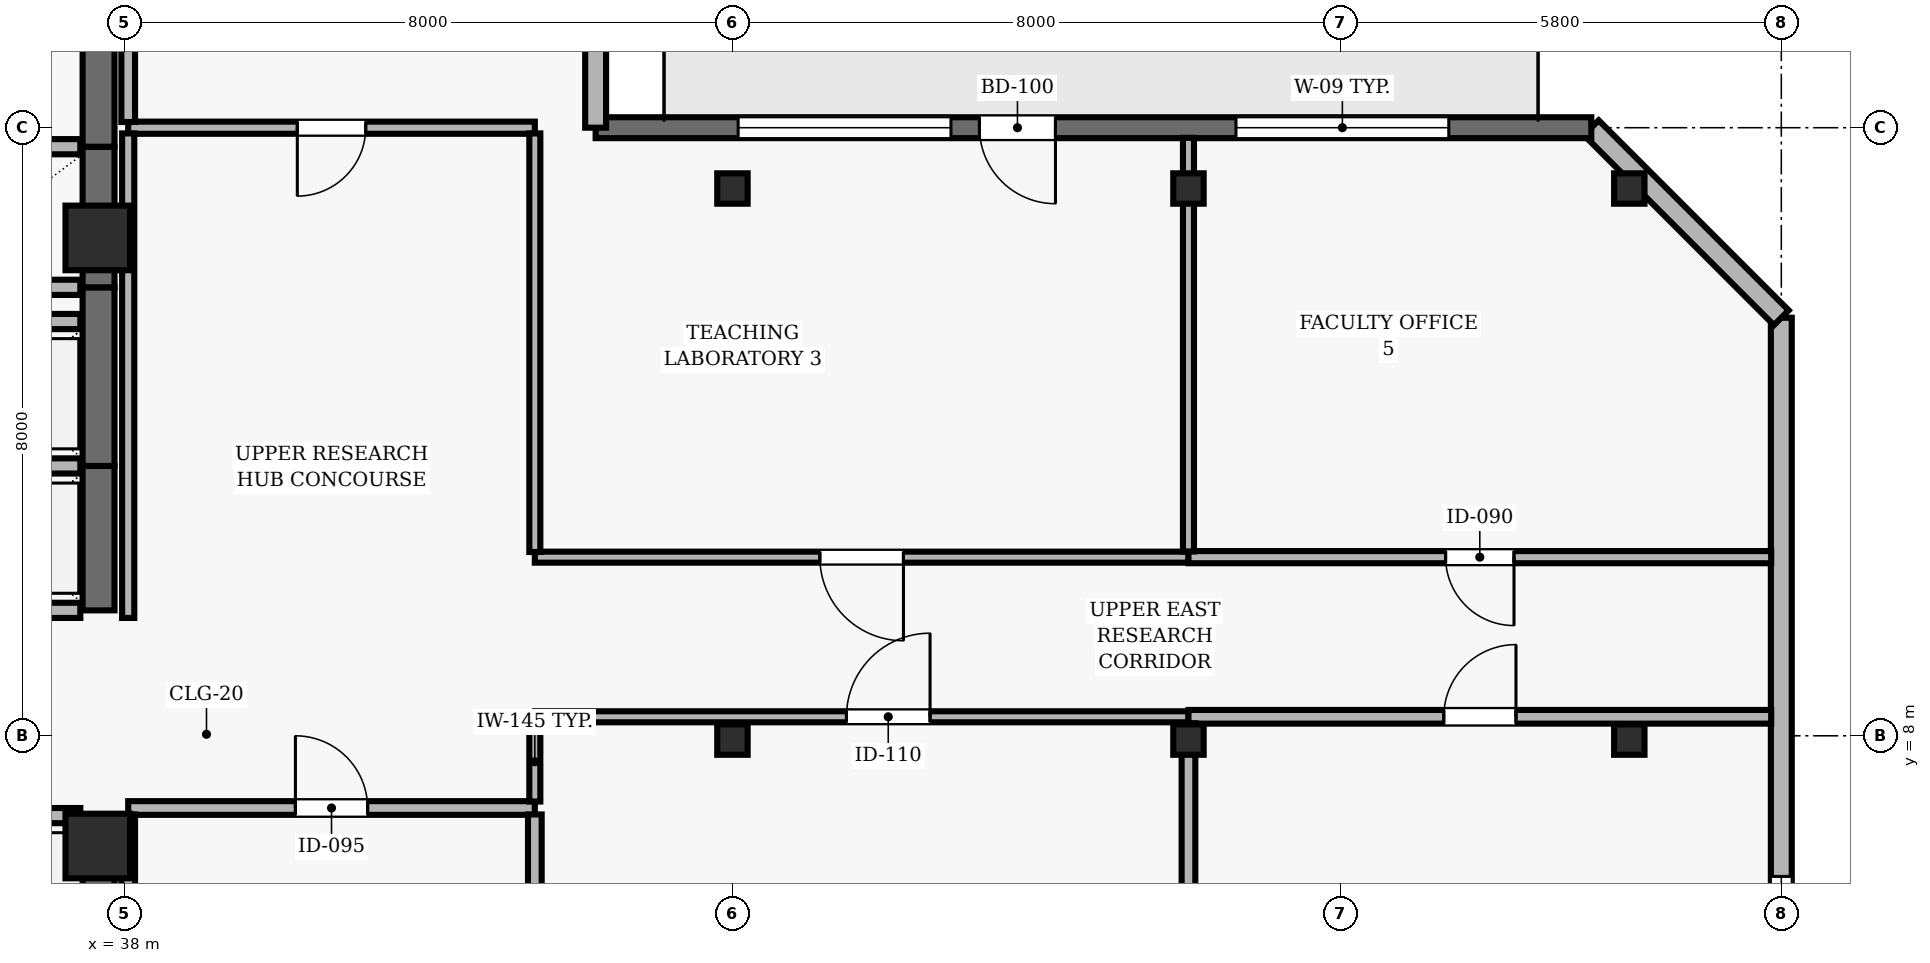
"""IFC4 building model, lengths in metres.
Left out: names, types, materials, properties, quantities, classifications, styles, units other than length and angle.
Written with IfcOpenShell. Run it as: python <this file> out.ifc"""

import sys

from ifc_helpers import new_model, si_unit, direction, frame, frame_2d, origin, origin_2d, place, context, subcontext, project, spatial, rectangle, hollow_rectangle, extrude, element, fill, save


model = new_model("IFC4")
c1 = context("Model", 3, precision=1e-05, world=origin(), true_north=direction((0.0, 1.0)))
c2 = subcontext(c1, "Body", "Model", "MODEL_VIEW")
j1 = project(units=[si_unit("LENGTHUNIT", "METRE"), si_unit("PLANEANGLEUNIT", "RADIAN")], contexts=[c1])
p1 = place(None, origin())
s1 = spatial("IfcSite", under=j1, at=p1, CompositionType="ELEMENT")
p2 = place(p1, origin())
s2 = spatial("IfcBuilding", under=s1, at=p2, CompositionType="ELEMENT")
p3 = place(p2, frame((0.0, 0.0, 263.8)))
s3 = spatial("IfcBuildingStorey", under=s2, at=p3, CompositionType="ELEMENT", Elevation=263.8)
for number, where, z_axis, x_axis in (
    (1, (37.65, 6.55, 0.0), (0.0, 0.0, 1.0), (1.0, 0.0, 0.0)),
    (2, (37.65, 14.55, 0.0), (0.0, 0.0, 1.0), (1.0, 0.0, 0.0)),
):
    element("IfcColumn", number, at=place(p3, frame(where, z_axis=z_axis, x_axis=x_axis)), inside=s3, PredefinedType="COLUMN", context=c2, shape_type="SweptSolid", body=[
        extrude(rectangle(XDim=0.85, YDim=0.85, at=origin_2d()), origin(), (0.0, 0.0, 1.0), 3.9),
    ])
for number, where, z_axis, x_axis in (
    (3, (46.0, 7.95, 0.0), (0.0, 0.0, 1.0), (1.0, 0.0, 0.0)),
    (4, (46.0, 15.2, 0.0), (0.0, 0.0, 1.0), (1.0, 0.0, 0.0)),
    (5, (52.0, 7.95, 0.0), (0.0, 0.0, 1.0), (1.0, 0.0, 0.0)),
    (6, (52.0, 15.2, 0.0), (0.0, 0.0, 1.0), (1.0, 0.0, 0.0)),
    (7, (57.8, 7.95, 0.0), (0.0, 0.0, 1.0), (1.0, 0.0, 0.0)),
    (8, (57.8, 15.2, 0.0), (0.0, 0.0, 1.0), (1.0, 0.0, 0.0)),
):
    element("IfcColumn", number, at=place(p3, frame(where, z_axis=z_axis, x_axis=x_axis)), inside=s3, PredefinedType="COLUMN", context=c2, shape_type="SweptSolid", body=[
        extrude(hollow_rectangle(XDim=0.4, YDim=0.4, WallThickness=0.02, at=origin_2d()), origin(), (0.0, 0.0, 1.0), 3.9),
    ])
p4 = place(p3, frame((59.8, 2.5, 0.0), z_axis=(0.0, 0.0, 1.0), x_axis=(0.0, 1.0, 0.0)))
e9 = element("IfcWall", 9, at=p4, inside=s3, PredefinedType="SOLIDWALL", context=c2, shape_type="SweptSolid", body=[
    extrude(rectangle(XDim=11.0, YDim=0.275, at=frame_2d((5.5, 0.0))), origin(), (0.0, 0.0, 1.0), 3.69),
])
p5 = place(p4, frame((1.85, 0.0, 0.9)))
e10 = element("IfcOpeningElement", 10, at=p5, cuts=e9, PredefinedType="OPENING", context=c2, shape_type="SweptSolid", body=[
    extrude(rectangle(XDim=1.8, YDim=1.8, at=frame_2d((0.9, 0.9))), frame((0.0, 0.147, 0.0), z_axis=(0.0, -1.0, 0.0), x_axis=(1.0, 0.0, 0.0)), (0.0, 0.0, 1.0), 0.295),
])
p6 = place(p3, frame((59.8, 13.5, 0.0), z_axis=(0.0, 0.0, 1.0), x_axis=(-0.707106781187, 0.707106781187, 0.0)))
e11 = element("IfcWall", 11, at=p6, inside=s3, PredefinedType="SOLIDWALL", context=c2, shape_type="SweptSolid", body=[
    extrude(rectangle(XDim=3.536, YDim=0.275, at=frame_2d((1.768, 0.0))), origin(), (0.0, 0.0, 1.0), 3.69),
])
p7 = place(p3, frame((57.3, 16.0, 0.0), z_axis=(0.0, 0.0, 1.0), x_axis=(-1.0, 0.0, 0.0)))
e12 = element("IfcWall", 12, at=p7, inside=s3, PredefinedType="SOLIDWALL", context=c2, shape_type="SweptSolid", body=[
    extrude(rectangle(XDim=13.1, YDim=0.275, at=frame_2d((6.55, 0.0))), origin(), (0.0, 0.0, 1.0), 3.69),
])
p8 = place(p7, frame((7.05, 0.0, 0.0)))
e13 = element("IfcOpeningElement", 13, at=p8, cuts=e12, PredefinedType="OPENING", context=c2, shape_type="SweptSolid", body=[
    extrude(rectangle(XDim=1.0, YDim=2.2, at=frame_2d((0.5, 1.1))), frame((0.0, 0.147, 0.0), z_axis=(0.0, -1.0, 0.0), x_axis=(1.0, 0.0, 0.0)), (0.0, 0.0, 1.0), 0.295),
])
p9 = place(p7, frame((1.875, 0.0, 0.9)))
e14 = element("IfcOpeningElement", 14, at=p9, cuts=e12, PredefinedType="OPENING", context=c2, shape_type="SweptSolid", body=[
    extrude(rectangle(XDim=2.8, YDim=1.8, at=frame_2d((1.4, 0.9))), frame((0.0, 0.147, 0.0), z_axis=(0.0, -1.0, 0.0), x_axis=(1.0, 0.0, 0.0)), (0.0, 0.0, 1.0), 0.295),
])
p10 = place(p7, frame((8.425, 0.0, 0.9)))
e15 = element("IfcOpeningElement", 15, at=p10, cuts=e12, PredefinedType="OPENING", context=c2, shape_type="SweptSolid", body=[
    extrude(rectangle(XDim=2.8, YDim=1.8, at=frame_2d((1.4, 0.9))), frame((0.0, 0.147, 0.0), z_axis=(0.0, -1.0, 0.0), x_axis=(1.0, 0.0, 0.0)), (0.0, 0.0, 1.0), 0.295),
])
p11 = place(p3, frame((44.2, 16.0, 0.0), z_axis=(0.0, 0.0, 1.0), x_axis=(0.0, 1.0, 0.0)))
e16 = element("IfcWall", 16, at=p11, inside=s3, PredefinedType="SOLIDWALL", context=c2, shape_type="SweptSolid", body=[
    extrude(rectangle(XDim=6.85, YDim=0.275, at=frame_2d((3.425, 0.0))), origin(), (0.0, 0.0, 1.0), 3.69),
])
p12 = place(p11, frame((2.525, 0.0, 0.9)))
e17 = element("IfcOpeningElement", 17, at=p12, cuts=e16, PredefinedType="OPENING", context=c2, shape_type="SweptSolid", body=[
    extrude(rectangle(XDim=1.8, YDim=2.2, at=frame_2d((0.9, 1.1))), frame((0.0, 0.147, 0.0), z_axis=(0.0, -1.0, 0.0), x_axis=(1.0, 0.0, 0.0)), (0.0, 0.0, 1.0), 0.295),
])
p13 = place(p3, frame((37.66, 4.7, 0.0), z_axis=(0.0, 0.0, 1.0), x_axis=(0.0, 1.0, 0.0)))
e18 = element("IfcWall", 18, at=p13, inside=s3, PredefinedType="SHEAR", context=c2, shape_type="SweptSolid", body=[
    extrude(rectangle(XDim=2.25, YDim=0.42, at=frame_2d((1.125, 0.0))), origin(), (0.0, 0.0, 1.0), 3.69),
])
p14 = place(p3, frame((37.42, 6.95, 0.0), z_axis=(0.0, 0.0, 1.0), x_axis=(-1.0, 0.0, 0.0)))
e19 = element("IfcWall", 19, at=p14, inside=s3, PredefinedType="SOLIDWALL", context=c2, shape_type="SweptSolid", body=[
    extrude(rectangle(XDim=2.14, YDim=0.2, at=frame_2d((1.07, 0.0))), origin(), (0.0, 0.0, 1.0), 3.69),
])
p15 = place(p3, frame((37.66, 9.65, 0.0), z_axis=(0.0, 0.0, 1.0), x_axis=(0.0, 1.0, 0.0)))
e20 = element("IfcWall", 20, at=p15, inside=s3, PredefinedType="SHEAR", context=c2, shape_type="SweptSolid", body=[
    extrude(rectangle(XDim=1.9, YDim=0.42, at=frame_2d((0.95, 0.0))), origin(), (0.0, 0.0, 1.0), 3.69),
])
for number, where, z_axis, x_axis in (
    (21, (35.28, 9.65, 0.0), (0.0, 0.0, 1.0), (1.0, 0.0, 0.0)),
    (22, (37.42, 11.55, 0.0), (0.0, 0.0, 1.0), (-1.0, 0.0, 0.0)),
):
    element("IfcWall", number, at=place(p3, frame(where, z_axis=z_axis, x_axis=x_axis)), inside=s3, PredefinedType="SOLIDWALL", context=c2, shape_type="SweptSolid", body=[
        extrude(rectangle(XDim=2.14, YDim=0.2, at=frame_2d((1.07, 0.0))), origin(), (0.0, 0.0, 1.0), 3.69),
    ])
p16 = place(p3, frame((37.66, 11.55, 0.0), z_axis=(0.0, 0.0, 1.0), x_axis=(0.0, 1.0, 0.0)))
e23 = element("IfcWall", 23, at=p16, inside=s3, PredefinedType="SHEAR", context=c2, shape_type="SweptSolid", body=[
    extrude(rectangle(XDim=2.35, YDim=0.42, at=frame_2d((1.175, 0.0))), origin(), (0.0, 0.0, 1.0), 3.69),
])
p17 = place(p3, frame((37.42, 13.45, 0.0), z_axis=(0.0, 0.0, 1.0), x_axis=(-1.0, 0.0, 0.0)))
e24 = element("IfcWall", 24, at=p17, inside=s3, PredefinedType="SOLIDWALL", context=c2, shape_type="SweptSolid", body=[
    extrude(rectangle(XDim=2.14, YDim=0.2, at=frame_2d((1.07, 0.0))), origin(), (0.0, 0.0, 1.0), 3.69),
])
p18 = place(p3, frame((37.66, 13.9, 0.0), z_axis=(0.0, 0.0, 1.0), x_axis=(0.0, 1.0, 0.0)))
e25 = element("IfcWall", 25, at=p18, inside=s3, PredefinedType="SHEAR", context=c2, shape_type="SweptSolid", body=[
    extrude(rectangle(XDim=1.85, YDim=0.42, at=frame_2d((0.925, 0.0))), origin(), (0.0, 0.0, 1.0), 3.69),
])
for number, where, z_axis, x_axis in (
    (26, (35.28, 13.9, 0.0), (0.0, 0.0, 1.0), (1.0, 0.0, 0.0)),
    (27, (37.42, 15.75, 0.0), (0.0, 0.0, 1.0), (-1.0, 0.0, 0.0)),
):
    element("IfcWall", number, at=place(p3, frame(where, z_axis=z_axis, x_axis=x_axis)), inside=s3, PredefinedType="SOLIDWALL", context=c2, shape_type="SweptSolid", body=[
        extrude(rectangle(XDim=2.14, YDim=0.2, at=frame_2d((1.07, 0.0))), origin(), (0.0, 0.0, 1.0), 3.69),
    ])
p19 = place(p3, frame((37.66, 15.75, 0.0), z_axis=(0.0, 0.0, 1.0), x_axis=(0.0, 1.0, 0.0)))
e28 = element("IfcWall", 28, at=p19, inside=s3, PredefinedType="SHEAR", context=c2, shape_type="SweptSolid", body=[
    extrude(rectangle(XDim=1.85, YDim=0.42, at=frame_2d((0.925, 0.0))), origin(), (0.0, 0.0, 1.0), 3.69),
])
p20 = place(p3, frame((38.05, 7.05, 0.0), z_axis=(0.0, 0.0, 1.0), x_axis=(1.0, 0.0, 0.0)))
e29 = element("IfcWall", 29, at=p20, inside=s3, PredefinedType="PARTITIONING", context=c2, shape_type="SweptSolid", body=[
    extrude(rectangle(XDim=5.35, YDim=0.18, at=frame_2d((2.675, 0.0))), origin(), (0.0, 0.0, 1.0), 3.69),
])
p21 = place(p20, frame((2.2, 0.0, 0.0)))
e30 = element("IfcOpeningElement", 30, at=p21, cuts=e29, PredefinedType="OPENING", context=c2, shape_type="SweptSolid", body=[
    extrude(rectangle(XDim=0.95, YDim=2.1, at=frame_2d((0.475, 1.05))), frame((0.0, 0.1, 0.0), z_axis=(0.0, -1.0, 0.0), x_axis=(1.0, 0.0, 0.0)), (0.0, 0.0, 1.0), 0.2),
])
p22 = place(p3, frame((43.4, 8.25, 0.0), z_axis=(0.0, 0.0, 1.0), x_axis=(1.0, 0.0, 0.0)))
e31 = element("IfcWall", 31, at=p22, inside=s3, PredefinedType="PARTITIONING", context=c2, shape_type="SweptSolid", body=[
    extrude(rectangle(XDim=8.6, YDim=0.145, at=frame_2d((4.3, 0.0))), origin(), (0.0, 0.0, 1.0), 3.221),
])
p23 = place(p22, frame((4.1, 0.0, 0.0)))
e32 = element("IfcOpeningElement", 32, at=p23, cuts=e31, PredefinedType="OPENING", context=c2, shape_type="SweptSolid", body=[
    extrude(rectangle(XDim=1.1, YDim=2.15, at=frame_2d((0.55, 1.075))), frame((0.0, 0.083, 0.0), z_axis=(0.0, -1.0, 0.0), x_axis=(1.0, 0.0, 0.0)), (0.0, 0.0, 1.0), 0.165),
])
p24 = place(p3, frame((43.4, 16.0, 0.0), z_axis=(0.0, 0.0, 1.0), x_axis=(-1.0, 0.0, 0.0)))
e33 = element("IfcWall", 33, at=p24, inside=s3, PredefinedType="PARTITIONING", context=c2, shape_type="SweptSolid", body=[
    extrude(rectangle(XDim=5.35, YDim=0.16, at=frame_2d((2.675, 0.0))), origin(), (0.0, 0.0, 1.0), 3.39),
])
p25 = place(p24, frame((2.225, 0.0, 0.0)))
e34 = element("IfcOpeningElement", 34, at=p25, cuts=e33, PredefinedType="OPENING", context=c2, shape_type="SweptSolid", body=[
    extrude(rectangle(XDim=0.9, YDim=2.1, at=frame_2d((0.45, 1.05))), frame((0.0, 0.09, 0.0), z_axis=(0.0, -1.0, 0.0), x_axis=(1.0, 0.0, 0.0)), (0.0, 0.0, 1.0), 0.18),
])
p26 = place(p3, frame((52.0, 8.25, 0.0), z_axis=(0.0, 0.0, 1.0), x_axis=(1.0, 0.0, 0.0)))
e35 = element("IfcWall", 35, at=p26, inside=s3, PredefinedType="PARTITIONING", context=c2, shape_type="SweptSolid", body=[
    extrude(rectangle(XDim=7.667, YDim=0.18, at=frame_2d((3.833, 0.0))), origin(), (0.0, 0.0, 1.0), 3.221),
])
p27 = place(p26, frame((3.359, 0.0, 0.0)))
e36 = element("IfcOpeningElement", 36, at=p27, cuts=e35, PredefinedType="OPENING", context=c2, shape_type="SweptSolid", body=[
    extrude(rectangle(XDim=0.95, YDim=2.1, at=frame_2d((0.475, 1.05))), frame((0.0, 0.1, 0.0), z_axis=(0.0, -1.0, 0.0), x_axis=(1.0, 0.0, 0.0)), (0.0, 0.0, 1.0), 0.2),
])
p28 = place(p3, frame((52.0, 10.35, 0.0), z_axis=(0.0, 0.0, 1.0), x_axis=(-1.0, 0.0, 0.0)))
e37 = element("IfcWall", 37, at=p28, inside=s3, PredefinedType="PARTITIONING", context=c2, shape_type="SweptSolid", body=[
    extrude(rectangle(XDim=8.6, YDim=0.145, at=frame_2d((4.3, 0.0))), origin(), (0.0, 0.0, 1.0), 3.372),
])
p29 = place(p28, frame((3.75, 0.0, 0.0)))
e38 = element("IfcOpeningElement", 38, at=p29, cuts=e37, PredefinedType="OPENING", context=c2, shape_type="SweptSolid", body=[
    extrude(rectangle(XDim=1.1, YDim=2.15, at=frame_2d((0.55, 1.075))), frame((0.0, 0.083, 0.0), z_axis=(0.0, -1.0, 0.0), x_axis=(1.0, 0.0, 0.0)), (0.0, 0.0, 1.0), 0.165),
])
p30 = place(p3, frame((59.667, 10.35, 0.0), z_axis=(0.0, 0.0, 1.0), x_axis=(-1.0, 0.0, 0.0)))
e39 = element("IfcWall", 39, at=p30, inside=s3, PredefinedType="PARTITIONING", context=c2, shape_type="SweptSolid", body=[
    extrude(rectangle(XDim=7.667, YDim=0.16, at=frame_2d((3.833, 0.0))), origin(), (0.0, 0.0, 1.0), 3.372),
])
p31 = place(p30, frame((3.384, 0.0, 0.0)))
e40 = element("IfcOpeningElement", 40, at=p31, cuts=e39, PredefinedType="OPENING", context=c2, shape_type="SweptSolid", body=[
    extrude(rectangle(XDim=0.9, YDim=2.1, at=frame_2d((0.45, 1.05))), frame((0.0, 0.09, 0.0), z_axis=(0.0, -1.0, 0.0), x_axis=(1.0, 0.0, 0.0)), (0.0, 0.0, 1.0), 0.18),
])
p32 = place(p3, frame((38.05, 6.965, 0.0), z_axis=(0.0, 0.0, 1.0), x_axis=(0.0, -1.0, 0.0)))
e41 = element("IfcWall", 41, at=p32, inside=s3, PredefinedType="PARTITIONING", context=c2, shape_type="SweptSolid", body=[
    extrude(rectangle(XDim=6.832, YDim=0.18, at=frame_2d((3.416, 0.0))), origin(), (0.0, 0.0, 1.0), 3.221),
])
p33 = place(p3, frame((38.05, 15.925, 0.0), z_axis=(0.0, 0.0, 1.0), x_axis=(0.0, -1.0, 0.0)))
e42 = element("IfcWall", 42, at=p33, inside=s3, PredefinedType="PARTITIONING", context=c2, shape_type="SweptSolid", body=[
    extrude(rectangle(XDim=6.375, YDim=0.16, at=frame_2d((3.188, 0.0))), origin(), (0.0, 0.0, 1.0), 3.221),
])
p34 = place(p3, frame((38.05, 23.918, 0.0), z_axis=(0.0, 0.0, 1.0), x_axis=(0.0, -1.0, 0.0)))
e43 = element("IfcWall", 43, at=p34, inside=s3, PredefinedType="PARTITIONING", context=c2, shape_type="SweptSolid", body=[
    extrude(rectangle(XDim=7.843, YDim=0.18, at=frame_2d((3.921, 0.0))), origin(), (0.0, 0.0, 1.0), 3.221),
])
p35 = place(p3, frame((43.4, 0.133, 0.0), z_axis=(0.0, 0.0, 1.0), x_axis=(0.0, 1.0, 0.0)))
e44 = element("IfcWall", 44, at=p35, inside=s3, PredefinedType="PARTITIONING", context=c2, shape_type="SweptSolid", body=[
    extrude(rectangle(XDim=6.832, YDim=0.18, at=frame_2d((3.416, 0.0))), origin(), (0.0, 0.0, 1.0), 3.69),
])
p36 = place(p3, frame((43.4, 7.135, 0.0), z_axis=(0.0, 0.0, 1.0), x_axis=(0.0, 1.0, 0.0)))
e45 = element("IfcWall", 45, at=p36, inside=s3, PredefinedType="PARTITIONING", context=c2, shape_type="SweptSolid", body=[
    extrude(rectangle(XDim=1.047, YDim=0.145, at=frame_2d((0.523, 0.0))), origin(), (0.0, 0.0, 1.0), 3.69),
])
p37 = place(p3, frame((43.4, 10.418, 0.0), z_axis=(0.0, 0.0, 1.0), x_axis=(0.0, 1.0, 0.0)))
e46 = element("IfcWall", 46, at=p37, inside=s3, PredefinedType="PARTITIONING", context=c2, shape_type="SweptSolid", body=[
    extrude(rectangle(XDim=5.507, YDim=0.145, at=frame_2d((2.753, 0.0))), origin(), (0.0, 0.0, 1.0), 3.69),
])
p38 = place(p3, frame((52.0, 0.133, 0.0), z_axis=(0.0, 0.0, 1.0), x_axis=(0.0, 1.0, 0.0)))
e47 = element("IfcWall", 47, at=p38, inside=s3, PredefinedType="PARTITIONING", context=c2, shape_type="SweptSolid", body=[
    extrude(rectangle(XDim=8.032, YDim=0.18, at=frame_2d((4.016, 0.0))), origin(), (0.0, 0.0, 1.0), 3.221),
])
p39 = place(p3, frame((52.0, 10.425, 0.0), z_axis=(0.0, 0.0, 1.0), x_axis=(0.0, 1.0, 0.0)))
e48 = element("IfcWall", 48, at=p39, inside=s3, PredefinedType="PARTITIONING", context=c2, shape_type="SweptSolid", body=[
    extrude(rectangle(XDim=5.442, YDim=0.145, at=frame_2d((2.721, 0.0))), origin(), (0.0, 0.0, 1.0), 3.221),
])
p40 = place(p5, origin())
e49 = element("IfcWindow", 49, at=p40, inside=s3, PartitioningType="SINGLE_PANEL", PredefinedType="WINDOW", context=c2, shape_type="SweptSolid", body=[
    extrude(rectangle(XDim=1.8, YDim=1.8, at=frame_2d((0.9, 0.9))), frame((0.0, 0.03, 0.0), z_axis=(0.0, -1.0, 0.0), x_axis=(1.0, 0.0, 0.0)), (0.0, 0.0, 1.0), 0.06),
])
fill(e10, e49)
p41 = place(p8, origin())
e50 = element("IfcDoor", 50, at=p41, inside=s3, OperationType="SINGLE_SWING_LEFT", PredefinedType="DOOR", context=c2, shape_type="SweptSolid", body=[
    extrude(rectangle(XDim=1.0, YDim=2.2, at=frame_2d((0.5, 1.1))), frame((0.0, 0.025, 0.0), z_axis=(0.0, -1.0, 0.0), x_axis=(1.0, 0.0, 0.0)), (0.0, 0.0, 1.0), 0.05),
])
fill(e13, e50)
p42 = place(p9, origin())
e51 = element("IfcWindow", 51, at=p42, inside=s3, PartitioningType="SINGLE_PANEL", PredefinedType="WINDOW", context=c2, shape_type="SweptSolid", body=[
    extrude(rectangle(XDim=2.8, YDim=1.8, at=frame_2d((1.4, 0.9))), frame((0.0, 0.03, 0.0), z_axis=(0.0, -1.0, 0.0), x_axis=(1.0, 0.0, 0.0)), (0.0, 0.0, 1.0), 0.06),
])
fill(e14, e51)
p43 = place(p10, origin())
e52 = element("IfcWindow", 52, at=p43, inside=s3, PartitioningType="SINGLE_PANEL", PredefinedType="WINDOW", context=c2, shape_type="SweptSolid", body=[
    extrude(rectangle(XDim=2.8, YDim=1.8, at=frame_2d((1.4, 0.9))), frame((0.0, 0.03, 0.0), z_axis=(0.0, -1.0, 0.0), x_axis=(1.0, 0.0, 0.0)), (0.0, 0.0, 1.0), 0.06),
])
fill(e15, e52)
p44 = place(p21, origin())
e53 = element("IfcDoor", 53, at=p44, inside=s3, OperationType="SINGLE_SWING_LEFT", PredefinedType="DOOR", context=c2, shape_type="SweptSolid", body=[
    extrude(rectangle(XDim=0.95, YDim=2.1, at=frame_2d((0.475, 1.05))), frame((0.0, 0.025, 0.0), z_axis=(0.0, -1.0, 0.0), x_axis=(1.0, 0.0, 0.0)), (0.0, 0.0, 1.0), 0.05),
])
fill(e30, e53)
p45 = place(p23, origin())
e54 = element("IfcDoor", 54, at=p45, inside=s3, OperationType="SINGLE_SWING_RIGHT", PredefinedType="DOOR", context=c2, shape_type="SweptSolid", body=[
    extrude(rectangle(XDim=1.1, YDim=2.15, at=frame_2d((0.55, 1.075))), frame((0.0, 0.025, 0.0), z_axis=(0.0, -1.0, 0.0), x_axis=(1.0, 0.0, 0.0)), (0.0, 0.0, 1.0), 0.05),
])
fill(e32, e54)
p46 = place(p29, origin())
e55 = element("IfcDoor", 55, at=p46, inside=s3, OperationType="SINGLE_SWING_LEFT", PredefinedType="DOOR", context=c2, shape_type="SweptSolid", body=[
    extrude(rectangle(XDim=1.1, YDim=2.15, at=frame_2d((0.55, 1.075))), frame((0.0, 0.025, 0.0), z_axis=(0.0, -1.0, 0.0), x_axis=(1.0, 0.0, 0.0)), (0.0, 0.0, 1.0), 0.05),
])
fill(e38, e55)
p47 = place(p27, origin())
e56 = element("IfcDoor", 56, at=p47, inside=s3, OperationType="SINGLE_SWING_RIGHT", PredefinedType="DOOR", context=c2, shape_type="SweptSolid", body=[
    extrude(rectangle(XDim=0.95, YDim=2.1, at=frame_2d((0.475, 1.05))), frame((0.0, 0.025, 0.0), z_axis=(0.0, -1.0, 0.0), x_axis=(1.0, 0.0, 0.0)), (0.0, 0.0, 1.0), 0.05),
])
fill(e36, e56)
p48 = place(p31, origin())
e57 = element("IfcDoor", 57, at=p48, inside=s3, OperationType="SINGLE_SWING_LEFT", PredefinedType="DOOR", context=c2, shape_type="SweptSolid", body=[
    extrude(rectangle(XDim=0.9, YDim=2.1, at=frame_2d((0.45, 1.05))), frame((0.0, 0.025, 0.0), z_axis=(0.0, -1.0, 0.0), x_axis=(1.0, 0.0, 0.0)), (0.0, 0.0, 1.0), 0.05),
])
fill(e40, e57)
p49 = place(p25, origin())
e58 = element("IfcDoor", 58, at=p49, inside=s3, OperationType="SINGLE_SWING_RIGHT", PredefinedType="DOOR", context=c2, shape_type="SweptSolid", body=[
    extrude(rectangle(XDim=0.9, YDim=2.1, at=frame_2d((0.45, 1.05))), frame((0.0, 0.025, 0.0), z_axis=(0.0, -1.0, 0.0), x_axis=(1.0, 0.0, 0.0)), (0.0, 0.0, 1.0), 0.05),
])
fill(e34, e58)
save(model, sys.argv[1])
